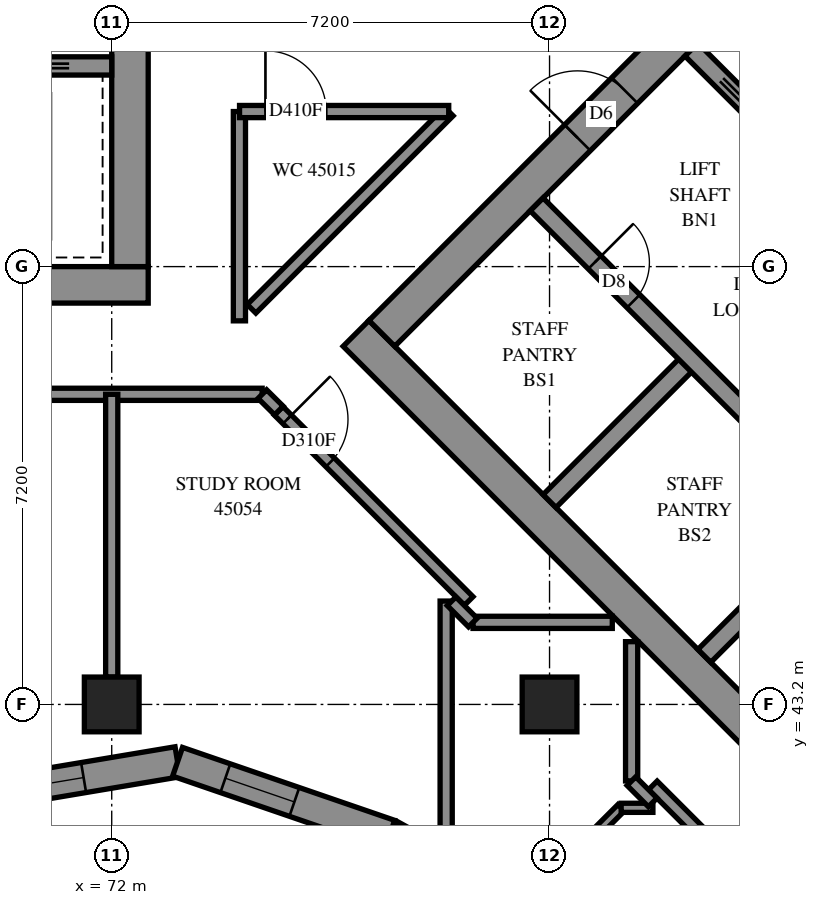
"""IFC4 building model, lengths in metres.
Left out: names, types, materials, properties, quantities, classifications, styles, units other than length and angle.
Written with IfcOpenShell. Run it as: python <this file> out.ifc"""

import sys

from ifc_helpers import new_model, si_unit, direction, frame, frame_2d, origin, origin_2d, place, context, subcontext, project, spatial, polyline, rectangle, outline, extrude, element, fill, save


model = new_model("IFC4")
c1 = context("Model", 3, precision=1e-05, world=origin(), true_north=direction((0.0, 1.0)))
c2 = subcontext(c1, "Body", "Model", "MODEL_VIEW")
j1 = project(units=[si_unit("LENGTHUNIT", "METRE"), si_unit("PLANEANGLEUNIT", "RADIAN")], contexts=[c1])
p1 = place(None, origin())
s1 = spatial("IfcSite", under=j1, at=p1, CompositionType="ELEMENT")
p2 = place(p1, origin())
s2 = spatial("IfcBuilding", under=s1, at=p2, CompositionType="ELEMENT")
p3 = place(p2, frame((0.0, 0.0, 166.0)))
s3 = spatial("IfcBuildingStorey", under=s2, at=p3, CompositionType="ELEMENT", Elevation=166.0)
for number, where, z_axis, x_axis in (
    (1, (72.0, 43.2, 0.0), (0.0, 0.0, 1.0), (1.0, 0.0, 0.0)),
    (2, (79.2, 43.2, 0.0), (0.0, 0.0, 1.0), (1.0, 0.0, 0.0)),
):
    element("IfcColumn", number, at=place(p3, frame(where, z_axis=z_axis, x_axis=x_axis)), inside=s3, PredefinedType="COLUMN", context=c2, shape_type="SweptSolid", body=[
        extrude(rectangle(XDim=0.9, YDim=0.9, at=origin_2d()), origin(), (0.0, 0.0, 1.0), 3.1),
    ])
p4 = place(p3, frame((57.0, 50.1, -0.3), z_axis=(0.0, 0.0, 1.0), x_axis=(1.0, 0.0, 0.0)))
e3 = element("IfcWall", 3, at=p4, inside=s3, PredefinedType="SHEAR", context=c2, shape_type="SweptSolid", body=[
    extrude(rectangle(XDim=15.6, YDim=0.6, at=frame_2d((7.8, 0.0))), origin(), (0.0, 0.0, 1.0), 2.7),
])
p5 = place(p3, frame((72.3, 50.4, -0.3), z_axis=(0.0, 0.0, 1.0), x_axis=(0.0, 1.0, 0.0)))
e4 = element("IfcWall", 4, at=p5, inside=s3, PredefinedType="SHEAR", context=c2, shape_type="SweptSolid", body=[
    extrude(rectangle(XDim=14.4, YDim=0.6, at=frame_2d((7.2, 0.0))), origin(), (0.0, 0.0, 1.0), 2.7),
])
p6 = place(p5, frame((4.55, 0.0, 0.3)))
e5 = element("IfcOpeningElement", 5, at=p6, cuts=e4, PredefinedType="OPENING", context=c2, shape_type="SweptSolid", body=[
    extrude(rectangle(XDim=1.1, YDim=2.1, at=frame_2d((0.55, 1.05))), frame((0.0, 0.31, 0.0), z_axis=(0.0, -1.0, 0.0), x_axis=(1.0, 0.0, 0.0)), (0.0, 0.0, 1.0), 0.62),
])
p7 = place(p5, frame((11.35, 0.0, 0.3)))
e6 = element("IfcOpeningElement", 6, at=p7, cuts=e4, PredefinedType="OPENING", context=c2, shape_type="SweptSolid", body=[
    extrude(rectangle(XDim=1.1, YDim=2.1, at=frame_2d((0.55, 1.05))), frame((0.0, 0.31, 0.0), z_axis=(0.0, -1.0, 0.0), x_axis=(1.0, 0.0, 0.0)), (0.0, 0.0, 1.0), 0.62),
])
p8 = place(p3, frame((57.6, 53.7, 0.0), z_axis=(0.0, 0.0, 1.0), x_axis=(1.0, 0.0, 0.0)))
e7 = element("IfcWall", 7, at=p8, inside=s3, PredefinedType="SOLIDWALL", context=c2, shape_type="SweptSolid", body=[
    extrude(rectangle(XDim=14.4, YDim=0.3, at=frame_2d((7.2, 0.0))), origin(), (0.0, 0.0, 1.0), 3.1),
])
p9 = place(p8, frame((1.35, 0.0, 0.0)))
e8 = element("IfcOpeningElement", 8, at=p9, cuts=e7, PredefinedType="OPENING", context=c2, shape_type="SweptSolid", body=[
    extrude(rectangle(XDim=0.9, YDim=2.1, at=frame_2d((0.45, 1.05))), frame((0.0, 0.16, 0.0), z_axis=(0.0, -1.0, 0.0), x_axis=(1.0, 0.0, 0.0)), (0.0, 0.0, 1.0), 0.32),
])
p10 = place(p8, frame((4.95, 0.0, 0.0)))
e9 = element("IfcOpeningElement", 9, at=p10, cuts=e7, PredefinedType="OPENING", context=c2, shape_type="SweptSolid", body=[
    extrude(rectangle(XDim=0.9, YDim=2.1, at=frame_2d((0.45, 1.05))), frame((0.0, 0.16, 0.0), z_axis=(0.0, -1.0, 0.0), x_axis=(1.0, 0.0, 0.0)), (0.0, 0.0, 1.0), 0.32),
])
p11 = place(p8, frame((8.55, 0.0, 0.0)))
e10 = element("IfcOpeningElement", 10, at=p11, cuts=e7, PredefinedType="OPENING", context=c2, shape_type="SweptSolid", body=[
    extrude(rectangle(XDim=0.9, YDim=2.1, at=frame_2d((0.45, 1.05))), frame((0.0, 0.16, 0.0), z_axis=(0.0, -1.0, 0.0), x_axis=(1.0, 0.0, 0.0)), (0.0, 0.0, 1.0), 0.32),
])
p12 = place(p8, frame((12.05, 0.0, 0.0)))
e11 = element("IfcOpeningElement", 11, at=p12, cuts=e7, PredefinedType="OPENING", context=c2, shape_type="SweptSolid", body=[
    extrude(rectangle(XDim=1.1, YDim=2.1, at=frame_2d((0.55, 1.05))), frame((0.0, 0.16, 0.0), z_axis=(0.0, -1.0, 0.0), x_axis=(1.0, 0.0, 0.0)), (0.0, 0.0, 1.0), 0.32),
])
p13 = place(p3, frame((76.018, 49.302, -0.3), z_axis=(0.0, 0.0, 1.0), x_axis=(0.7071067812, -0.7071067812, 0.0)))
e12 = element("IfcWall", 12, at=p13, inside=s3, PredefinedType="SHEAR", context=c2, shape_type="SweptSolid", body=[
    extrude(rectangle(XDim=15.6, YDim=0.6, at=frame_2d((7.8, 0.0))), origin(), (0.0, 0.0, 1.0), 2.7),
])
p14 = place(p3, frame((76.442, 49.302, -0.3), z_axis=(0.0, 0.0, 1.0), x_axis=(0.7071067812, 0.7071067812, 0.0)))
e13 = element("IfcWall", 13, at=p14, inside=s3, PredefinedType="SHEAR", context=c2, shape_type="SweptSolid", body=[
    extrude(rectangle(XDim=14.4, YDim=0.6, at=frame_2d((7.2, 0.0))), origin(), (0.0, 0.0, 1.0), 2.7),
])
p15 = place(p14, frame((4.55, 0.0, 0.3)))
e14 = element("IfcOpeningElement", 14, at=p15, cuts=e13, PredefinedType="OPENING", context=c2, shape_type="SweptSolid", body=[
    extrude(rectangle(XDim=1.1, YDim=2.1, at=frame_2d((0.55, 1.05))), frame((0.0, 0.31, 0.0), z_axis=(0.0, -1.0, 0.0), x_axis=(1.0, 0.0, 0.0)), (0.0, 0.0, 1.0), 0.62),
])
p16 = place(p14, frame((11.35, 0.0, 0.3)))
e15 = element("IfcOpeningElement", 15, at=p16, cuts=e13, PredefinedType="OPENING", context=c2, shape_type="SweptSolid", body=[
    extrude(rectangle(XDim=1.1, YDim=2.1, at=frame_2d((0.55, 1.05))), frame((0.0, 0.31, 0.0), z_axis=(0.0, -1.0, 0.0), x_axis=(1.0, 0.0, 0.0)), (0.0, 0.0, 1.0), 0.62),
])
p17 = place(p3, frame((79.2, 46.544, 0.0), z_axis=(0.0, 0.0, 1.0), x_axis=(0.7071219326, 0.7070916295, 0.0)))
e16 = element("IfcWall", 16, at=p17, inside=s3, PredefinedType="SOLIDWALL", context=c2, shape_type="SweptSolid", body=[
    extrude(rectangle(XDim=3.3, YDim=0.3, at=frame_2d((1.65, 0.0))), origin(), (0.0, 0.0, 1.0), 3.1),
])
p18 = place(p3, frame((81.746, 43.999, 0.0), z_axis=(0.0, 0.0, 1.0), x_axis=(0.7071067812, 0.7071067812, 0.0)))
e17 = element("IfcWall", 17, at=p18, inside=s3, PredefinedType="SOLIDWALL", context=c2, shape_type="SweptSolid", body=[
    extrude(rectangle(XDim=3.3, YDim=0.3, at=frame_2d((1.65, 0.0))), origin(), (0.0, 0.0, 1.0), 3.1),
])
p19 = place(p3, frame((78.988, 51.423, 0.0), z_axis=(0.0, 0.0, 1.0), x_axis=(0.7071067812, -0.7071067812, 0.0)))
e18 = element("IfcWall", 18, at=p19, inside=s3, PredefinedType="SOLIDWALL", context=c2, shape_type="SweptSolid", body=[
    extrude(rectangle(XDim=14.4, YDim=0.3, at=frame_2d((7.2, 0.0))), origin(), (0.0, 0.0, 1.0), 3.1),
])
p20 = place(p19, frame((1.35, 0.0, 0.0)))
e19 = element("IfcOpeningElement", 19, at=p20, cuts=e18, PredefinedType="OPENING", context=c2, shape_type="SweptSolid", body=[
    extrude(rectangle(XDim=0.9, YDim=2.1, at=frame_2d((0.45, 1.05))), frame((0.0, 0.16, 0.0), z_axis=(0.0, -1.0, 0.0), x_axis=(1.0, 0.0, 0.0)), (0.0, 0.0, 1.0), 0.32),
])
p21 = place(p19, frame((4.95, 0.0, 0.0)))
e20 = element("IfcOpeningElement", 20, at=p21, cuts=e18, PredefinedType="OPENING", context=c2, shape_type="SweptSolid", body=[
    extrude(rectangle(XDim=0.9, YDim=2.1, at=frame_2d((0.45, 1.05))), frame((0.0, 0.16, 0.0), z_axis=(0.0, -1.0, 0.0), x_axis=(1.0, 0.0, 0.0)), (0.0, 0.0, 1.0), 0.32),
])
p22 = place(p19, frame((8.55, 0.0, 0.0)))
e21 = element("IfcOpeningElement", 21, at=p22, cuts=e18, PredefinedType="OPENING", context=c2, shape_type="SweptSolid", body=[
    extrude(rectangle(XDim=0.9, YDim=2.1, at=frame_2d((0.45, 1.05))), frame((0.0, 0.16, 0.0), z_axis=(0.0, -1.0, 0.0), x_axis=(1.0, 0.0, 0.0)), (0.0, 0.0, 1.0), 0.32),
])
p23 = place(p19, frame((12.05, 0.0, 0.0)))
e22 = element("IfcOpeningElement", 22, at=p23, cuts=e18, PredefinedType="OPENING", context=c2, shape_type="SweptSolid", body=[
    extrude(rectangle(XDim=1.1, YDim=2.1, at=frame_2d((0.55, 1.05))), frame((0.0, 0.16, 0.0), z_axis=(0.0, -1.0, 0.0), x_axis=(1.0, 0.0, 0.0)), (0.0, 0.0, 1.0), 0.32),
])
p24 = place(p3, frame((81.534, 53.969, 0.0), z_axis=(0.0, 0.0, 1.0), x_axis=(0.707103309, -0.7071102534, 0.0)))
e23 = element("IfcWall", 23, at=p24, inside=s3, PredefinedType="SOLIDWALL", context=c2, shape_type="SweptSolid", body=[
    extrude(rectangle(XDim=14.4, YDim=0.3, at=frame_2d((7.2, 0.0))), origin(), (0.0, 0.0, 1.0), 3.1),
])
p25 = place(p24, frame((1.25, 0.0, 0.0)))
e24 = element("IfcOpeningElement", 24, at=p25, cuts=e23, PredefinedType="OPENING", context=c2, shape_type="SweptSolid", body=[
    extrude(rectangle(XDim=1.1, YDim=2.1, at=frame_2d((0.55, 1.05))), frame((0.0, 0.16, 0.0), z_axis=(0.0, -1.0, 0.0), x_axis=(1.0, 0.0, 0.0)), (0.0, 0.0, 1.0), 0.32),
])
p26 = place(p24, frame((4.85, 0.0, 0.0)))
e25 = element("IfcOpeningElement", 25, at=p26, cuts=e23, PredefinedType="OPENING", context=c2, shape_type="SweptSolid", body=[
    extrude(rectangle(XDim=1.1, YDim=2.1, at=frame_2d((0.55, 1.05))), frame((0.0, 0.16, 0.0), z_axis=(0.0, -1.0, 0.0), x_axis=(1.0, 0.0, 0.0)), (0.0, 0.0, 1.0), 0.32),
])
p27 = place(p24, frame((8.45, 0.0, 0.0)))
e26 = element("IfcOpeningElement", 26, at=p27, cuts=e23, PredefinedType="OPENING", context=c2, shape_type="SweptSolid", body=[
    extrude(rectangle(XDim=1.1, YDim=2.1, at=frame_2d((0.55, 1.05))), frame((0.0, 0.16, 0.0), z_axis=(0.0, -1.0, 0.0), x_axis=(1.0, 0.0, 0.0)), (0.0, 0.0, 1.0), 0.32),
])
p28 = place(p24, frame((12.05, 0.0, 0.0)))
e27 = element("IfcOpeningElement", 27, at=p28, cuts=e23, PredefinedType="OPENING", context=c2, shape_type="SweptSolid", body=[
    extrude(rectangle(XDim=1.1, YDim=2.1, at=frame_2d((0.55, 1.05))), frame((0.0, 0.16, 0.0), z_axis=(0.0, -1.0, 0.0), x_axis=(1.0, 0.0, 0.0)), (0.0, 0.0, 1.0), 0.32),
])
p29 = place(p3, frame((69.653, 41.681, 0.0), z_axis=(0.0, 0.0, 1.0), x_axis=(0.9862107034, 0.1654945573, 0.0)))
e28 = element("IfcWall", 28, at=p29, inside=s3, PredefinedType="SOLIDWALL", context=c2, shape_type="SweptSolid", body=[
    extrude(outline(polyline([(-0.042, -0.25), (3.414, -0.25), (3.542, 0.25), (0.042, 0.25), (-0.042, -0.25)])), origin(), (0.0, 0.0, 1.0), 3.1),
])
p30 = place(p29, frame((0.711, 0.0, 0.45)))
e29 = element("IfcOpeningElement", 29, at=p30, cuts=e28, PredefinedType="OPENING", context=c2, shape_type="SweptSolid", body=[
    extrude(rectangle(XDim=1.2, YDim=2.5, at=frame_2d((0.6, 1.25))), frame((0.0, 0.26, 0.0), z_axis=(0.0, -1.0, 0.0), x_axis=(1.0, 0.0, 0.0)), (0.0, 0.0, 1.0), 0.52),
])
p31 = place(p3, frame((73.083, 42.257, 0.0), z_axis=(0.0, 0.0, 1.0), x_axis=(0.9456655076, -0.3251411198, 0.0)))
e30 = element("IfcWall", 30, at=p31, inside=s3, PredefinedType="SOLIDWALL", context=c2, shape_type="SweptSolid", body=[
    extrude(outline(polyline([(0.064, -0.25), (3.668, -0.25), (3.711, 0.25), (-0.064, 0.25), (0.064, -0.25)])), origin(), (0.0, 0.0, 1.0), 3.1),
])
p32 = place(p31, frame((0.831, 0.0, 0.45)))
e31 = element("IfcOpeningElement", 31, at=p32, cuts=e30, PredefinedType="OPENING", context=c2, shape_type="SweptSolid", body=[
    extrude(rectangle(XDim=1.2, YDim=2.5, at=frame_2d((0.6, 1.25))), frame((0.0, 0.26, 0.0), z_axis=(0.0, -1.0, 0.0), x_axis=(1.0, 0.0, 0.0)), (0.0, 0.0, 1.0), 0.52),
])
p33 = place(p3, frame((76.572, 41.057, 0.0), z_axis=(0.0, 0.0, 1.0), x_axis=(0.8758607795, -0.4825638765, 0.0)))
e32 = element("IfcWall", 32, at=p33, inside=s3, PredefinedType="SOLIDWALL", context=c2, shape_type="SweptSolid", body=[
    extrude(outline(polyline([(0.022, -0.25), (4.236, -0.25), (4.343, 0.25), (-0.022, 0.25), (0.022, -0.25)])), origin(), (0.0, 0.0, 1.0), 3.1),
])
p34 = place(p33, frame((0.322, 0.0, 0.45)))
e33 = element("IfcOpeningElement", 33, at=p34, cuts=e32, PredefinedType="OPENING", context=c2, shape_type="SweptSolid", body=[
    extrude(rectangle(XDim=1.2, YDim=2.5, at=frame_2d((0.6, 1.25))), frame((0.0, 0.26, 0.0), z_axis=(0.0, -1.0, 0.0), x_axis=(1.0, 0.0, 0.0)), (0.0, 0.0, 1.0), 0.52),
])
p35 = place(p33, frame((2.666, 0.0, 0.45)))
e34 = element("IfcOpeningElement", 34, at=p35, cuts=e32, PredefinedType="OPENING", context=c2, shape_type="SweptSolid", body=[
    extrude(rectangle(XDim=1.2, YDim=2.5, at=frame_2d((0.6, 1.25))), frame((0.0, 0.26, 0.0), z_axis=(0.0, -1.0, 0.0), x_axis=(1.0, 0.0, 0.0)), (0.0, 0.0, 1.0), 0.52),
])
p36 = place(p3, frame((55.5, 48.3, 0.0), z_axis=(0.0, 0.0, 1.0), x_axis=(1.0, 0.0, 0.0)))
e35 = element("IfcWall", 35, at=p36, inside=s3, PredefinedType="PARTITIONING", context=c2, shape_type="SweptSolid", body=[
    extrude(rectangle(XDim=18.974, YDim=0.2, at=frame_2d((9.487, 0.0))), origin(), (0.0, 0.0, 1.0), 3.1),
])
p37 = place(p36, frame((5.963, 0.0, 0.0)))
e36 = element("IfcOpeningElement", 36, at=p37, cuts=e35, PredefinedType="OPENING", context=c2, shape_type="SweptSolid", body=[
    extrude(rectangle(XDim=1.0, YDim=2.1, at=frame_2d((0.5, 1.05))), frame((0.0, 0.11, 0.0), z_axis=(0.0, -1.0, 0.0), x_axis=(1.0, 0.0, 0.0)), (0.0, 0.0, 1.0), 0.22),
])
p38 = place(p36, frame((13.161, 0.0, 0.0)))
e37 = element("IfcOpeningElement", 37, at=p38, cuts=e35, PredefinedType="OPENING", context=c2, shape_type="SweptSolid", body=[
    extrude(rectangle(XDim=0.9, YDim=2.1, at=frame_2d((0.45, 1.05))), frame((0.0, 0.11, 0.0), z_axis=(0.0, -1.0, 0.0), x_axis=(1.0, 0.0, 0.0)), (0.0, 0.0, 1.0), 0.22),
])
p39 = place(p3, frame((80.899, 41.869, 0.0), z_axis=(0.0, 0.0, 1.0), x_axis=(0.7071067812, -0.7071067812, 0.0)))
e38 = element("IfcWall", 38, at=p39, inside=s3, PredefinedType="PARTITIONING", context=c2, shape_type="SweptSolid", body=[
    extrude(rectangle(XDim=8.392, YDim=0.2, at=frame_2d((4.196, 0.0))), origin(), (0.0, 0.0, 1.0), 3.1),
])
p40 = place(p39, frame((4.979, 0.0, 0.0)))
e39 = element("IfcOpeningElement", 39, at=p40, cuts=e38, PredefinedType="OPENING", context=c2, shape_type="SweptSolid", body=[
    extrude(rectangle(XDim=0.9, YDim=2.1, at=frame_2d((0.45, 1.05))), frame((0.0, 0.11, 0.0), z_axis=(0.0, -1.0, 0.0), x_axis=(1.0, 0.0, 0.0)), (0.0, 0.0, 1.0), 0.22),
])
p41 = place(p3, frame((72.0, 43.65, 0.0), z_axis=(0.0, 0.0, 1.0), x_axis=(0.0, 1.0, 0.0)))
e40 = element("IfcWall", 40, at=p41, inside=s3, PredefinedType="PARTITIONING", context=c2, shape_type="SweptSolid", body=[
    extrude(rectangle(XDim=4.65, YDim=0.2, at=frame_2d((2.325, 0.0))), origin(), (0.0, 0.0, 1.0), 3.1),
])
p42 = place(p3, frame((74.3, 49.706, 0.0), z_axis=(0.0, 0.0, 1.0), x_axis=(0.7071067812, 0.7071067812, 0.0)))
e41 = element("IfcWall", 41, at=p42, inside=s3, PredefinedType="PARTITIONING", context=c2, shape_type="SweptSolid", body=[
    extrude(rectangle(XDim=4.588, YDim=0.2, at=frame_2d((2.294, 0.0))), origin(), (0.0, 0.0, 1.0), 3.1),
])
p43 = place(p3, frame((74.745, 48.029, 0.0), z_axis=(0.0, 0.0, 1.0), x_axis=(0.7068806156, -0.7073328745, 0.0)))
e42 = element("IfcWall", 42, at=p43, inside=s3, PredefinedType="PARTITIONING", context=c2, shape_type="SweptSolid", body=[
    extrude(rectangle(XDim=4.422, YDim=0.2, at=frame_2d((2.211, 0.0))), origin(), (0.0, 0.0, 1.0), 3.1),
])
p44 = place(p43, frame((0.199, 0.0, 0.0)))
e43 = element("IfcOpeningElement", 43, at=p44, cuts=e42, PredefinedType="OPENING", context=c2, shape_type="SweptSolid", body=[
    extrude(rectangle(XDim=1.0, YDim=2.1, at=frame_2d((0.5, 1.05))), frame((0.0, 0.11, 0.0), z_axis=(0.0, -1.0, 0.0), x_axis=(1.0, 0.0, 0.0)), (0.0, 0.0, 1.0), 0.22),
])
p45 = place(p3, frame((77.5, 40.832, 0.0), z_axis=(0.0, 0.0, 1.0), x_axis=(0.0, 1.0, 0.0)))
e44 = element("IfcWall", 44, at=p45, inside=s3, PredefinedType="PARTITIONING", context=c2, shape_type="SweptSolid", body=[
    extrude(rectangle(XDim=4.068, YDim=0.2, at=frame_2d((2.034, 0.0))), origin(), (0.0, 0.0, 1.0), 3.1),
])
p46 = place(p3, frame((74.1, 49.508, 0.0), z_axis=(0.0, 0.0, 1.0), x_axis=(0.0, 1.0, 0.0)))
e45 = element("IfcWall", 45, at=p46, inside=s3, PredefinedType="PARTITIONING", context=c2, shape_type="SweptSolid", body=[
    extrude(rectangle(XDim=3.442, YDim=0.2, at=frame_2d((1.721, 0.0))), origin(), (0.0, 0.0, 1.0), 3.1),
])
p47 = place(p3, frame((74.102, 52.95, 0.0), z_axis=(0.0, 0.0, 1.0), x_axis=(1.0, 0.0, 0.0)))
e46 = element("IfcWall", 46, at=p47, inside=s3, PredefinedType="PARTITIONING", context=c2, shape_type="SweptSolid", body=[
    extrude(rectangle(XDim=3.44, YDim=0.2, at=frame_2d((1.72, 0.0))), origin(), (0.0, 0.0, 1.0), 3.1),
])
p48 = place(p47, frame((0.426, 0.0, 0.0)))
e47 = element("IfcOpeningElement", 47, at=p48, cuts=e46, PredefinedType="OPENING", context=c2, shape_type="SweptSolid", body=[
    extrude(rectangle(XDim=1.0, YDim=2.1, at=frame_2d((0.5, 1.05))), frame((0.0, 0.11, 0.0), z_axis=(0.0, -1.0, 0.0), x_axis=(1.0, 0.0, 0.0)), (0.0, 0.0, 1.0), 0.22),
])
for number, where, z_axis, x_axis in (
    (48, (77.942, 44.55, 0.0), (0.0, 0.0, 1.0), (1.0, 0.0, 0.0)),
    (49, (80.55, 41.942, 0.0), (0.0, 0.0, 1.0), (0.0, 1.0, 0.0)),
):
    element("IfcWall", number, at=place(p3, frame(where, z_axis=z_axis, x_axis=x_axis)), inside=s3, PredefinedType="PARTITIONING", context=c2, shape_type="SweptSolid", body=[
        extrude(rectangle(XDim=2.29, YDim=0.2, at=frame_2d((1.145, 0.0))), origin(), (0.0, 0.0, 1.0), 3.1),
    ])
p49 = place(p3, frame((78.924, 40.047, 0.0), z_axis=(0.0, 0.0, 1.0), x_axis=(0.7071067812, 0.7071067812, 0.0)))
e50 = element("IfcWall", 50, at=p49, inside=s3, PredefinedType="PARTITIONING", context=c2, shape_type="SweptSolid", body=[
    extrude(rectangle(XDim=2.056, YDim=0.15, at=frame_2d((1.028, 0.0))), origin(), (0.0, 0.0, 1.0), 3.1),
])
p50 = place(p3, frame((80.378, 41.5, 0.0), z_axis=(0.0, 0.0, 1.0), x_axis=(1.0, 0.0, 0.0)))
e51 = element("IfcWall", 51, at=p50, inside=s3, PredefinedType="PARTITIONING", context=c2, shape_type="SweptSolid", body=[
    extrude(rectangle(XDim=0.522, YDim=0.15, at=frame_2d((0.261, 0.0))), origin(), (0.0, 0.0, 1.0), 3.1),
])
for number, where, z_axis, x_axis in (
    (52, (77.588, 44.897, 0.0), (0.0, 0.0, 1.0), (0.707, -0.707, 0.0)),
    (53, (80.546, 41.938, 0.0), (0.0, 0.0, 1.0), (0.707, -0.707, 0.0)),
):
    element("IfcWall", number, at=place(p3, frame(where, z_axis=z_axis, x_axis=x_axis)), inside=s3, PredefinedType="PARTITIONING", context=c2, shape_type="SweptSolid", body=[
        extrude(rectangle(XDim=0.495, YDim=0.2, at=frame_2d((0.247, 0.0))), origin(), (0.0, 0.0, 1.0), 3.1),
    ])
p51 = place(p3, frame((74.477, 48.303, 0.0), z_axis=(0.0, 0.0, 1.0), x_axis=(0.7097111995, -0.7044927348, 0.0)))
e54 = element("IfcWall", 54, at=p51, inside=s3, PredefinedType="PARTITIONING", context=c2, shape_type="SweptSolid", body=[
    extrude(rectangle(XDim=0.383, YDim=0.2, at=frame_2d((0.192, 0.0))), origin(), (0.0, 0.0, 1.0), 3.1),
])
p52 = place(p30, origin())
e55 = element("IfcWindow", 55, at=p52, inside=s3, PartitioningType="SINGLE_PANEL", PredefinedType="WINDOW", context=c2, shape_type="SweptSolid", body=[
    extrude(rectangle(XDim=1.2, YDim=2.5, at=frame_2d((0.6, 1.25))), frame((0.0, 0.18, 0.0), z_axis=(0.0, -1.0, 0.0), x_axis=(1.0, 0.0, 0.0)), (0.0, 0.0, 1.0), 0.06),
])
fill(e29, e55)
p53 = place(p32, origin())
e56 = element("IfcWindow", 56, at=p53, inside=s3, PartitioningType="SINGLE_PANEL", PredefinedType="WINDOW", context=c2, shape_type="SweptSolid", body=[
    extrude(rectangle(XDim=1.2, YDim=2.5, at=frame_2d((0.6, 1.25))), frame((0.0, 0.18, 0.0), z_axis=(0.0, -1.0, 0.0), x_axis=(1.0, 0.0, 0.0)), (0.0, 0.0, 1.0), 0.06),
])
fill(e31, e56)
p54 = place(p15, origin())
e57 = element("IfcDoor", 57, at=p54, inside=s3, OperationType="DOUBLE_DOOR_SINGLE_SWING", PredefinedType="DOOR", context=c2, shape_type="SweptSolid", body=[
    extrude(rectangle(XDim=1.1, YDim=2.1, at=frame_2d((0.55, 1.05))), frame((0.0, 0.025, 0.0), z_axis=(0.0, -1.0, 0.0), x_axis=(1.0, 0.0, 0.0)), (0.0, 0.0, 1.0), 0.05),
])
fill(e14, e57)
p55 = place(p20, origin())
e58 = element("IfcDoor", 58, at=p55, inside=s3, OperationType="SINGLE_SWING_LEFT", PredefinedType="DOOR", context=c2, shape_type="SweptSolid", body=[
    extrude(rectangle(XDim=0.9, YDim=2.1, at=frame_2d((0.45, 1.05))), frame((0.0, 0.025, 0.0), z_axis=(0.0, -1.0, 0.0), x_axis=(1.0, 0.0, 0.0)), (0.0, 0.0, 1.0), 0.05),
])
fill(e19, e58)
p56 = place(p48, origin())
e59 = element("IfcDoor", 59, at=p56, inside=s3, OperationType="SINGLE_SWING_RIGHT", PredefinedType="DOOR", context=c2, shape_type="SweptSolid", body=[
    extrude(rectangle(XDim=1.0, YDim=2.1, at=frame_2d((0.5, 1.05))), frame((0.0, 0.025, 0.0), z_axis=(0.0, -1.0, 0.0), x_axis=(1.0, 0.0, 0.0)), (0.0, 0.0, 1.0), 0.05),
])
fill(e47, e59)
p57 = place(p44, origin())
e60 = element("IfcDoor", 60, at=p57, inside=s3, OperationType="SINGLE_SWING_LEFT", PredefinedType="DOOR", context=c2, shape_type="SweptSolid", body=[
    extrude(rectangle(XDim=1.0, YDim=2.1, at=frame_2d((0.5, 1.05))), frame((0.0, 0.025, 0.0), z_axis=(0.0, -1.0, 0.0), x_axis=(1.0, 0.0, 0.0)), (0.0, 0.0, 1.0), 0.05),
])
fill(e43, e60)
save(model, sys.argv[1])
